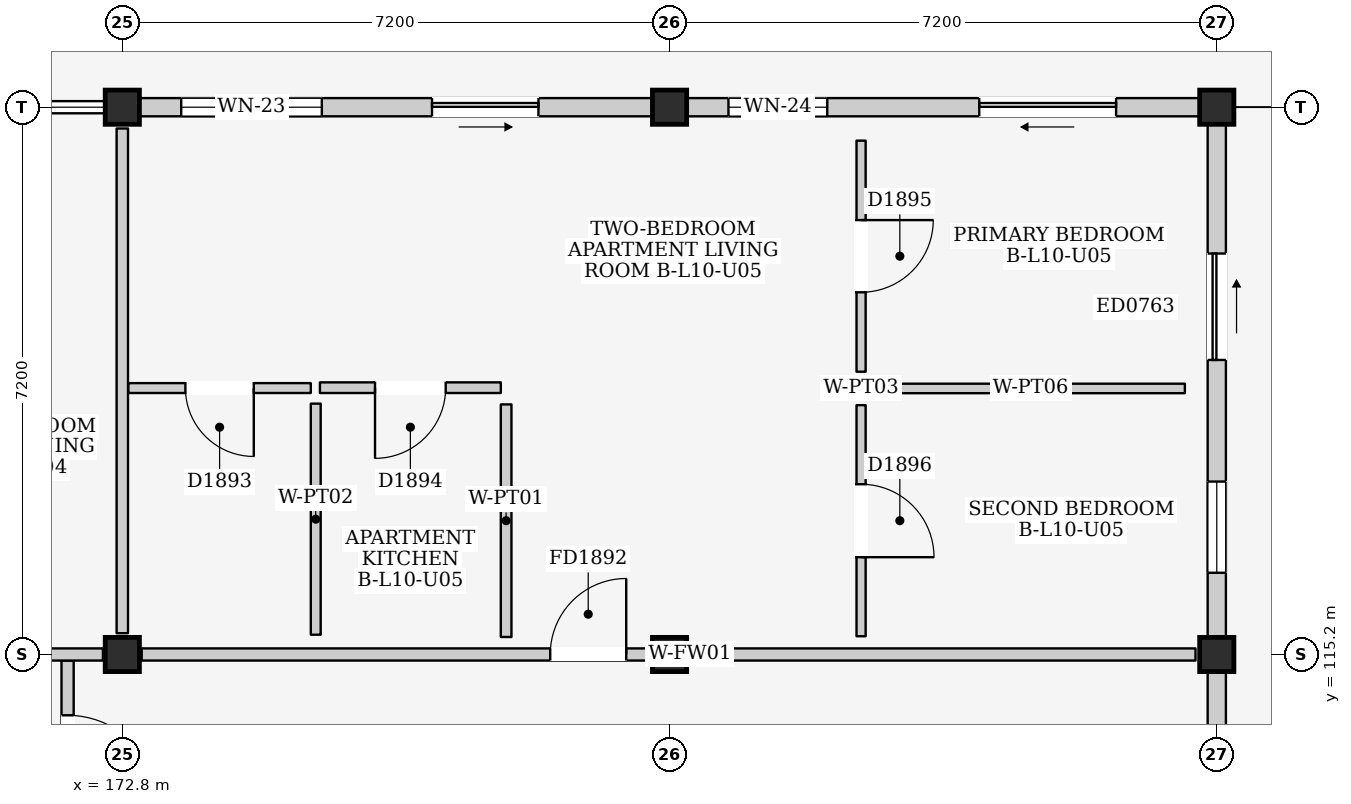
"""IFC4 building model, lengths in metres.
Left out: names, types, materials, properties, quantities, classifications, styles, units other than length and angle.
Written with IfcOpenShell. Run it as: python <this file> out.ifc"""

import sys

from ifc_helpers import new_model, si_unit, direction, frame, frame_2d, origin, origin_2d, place, context, subcontext, project, spatial, rectangle, extrude, element, fill, save


model = new_model("IFC4")
c1 = context("Model", 3, precision=1e-05, world=origin(), true_north=direction((0.0, 1.0)))
c2 = subcontext(c1, "Body", "Model", "MODEL_VIEW")
j1 = project(units=[si_unit("LENGTHUNIT", "METRE"), si_unit("PLANEANGLEUNIT", "RADIAN")], contexts=[c1])
p1 = place(None, origin())
s1 = spatial("IfcSite", under=j1, at=p1, CompositionType="ELEMENT")
p2 = place(p1, origin())
s2 = spatial("IfcBuilding", under=s1, at=p2, CompositionType="ELEMENT")
p3 = place(p2, frame((0.0, 0.0, 34.8)))
s3 = spatial("IfcBuildingStorey", under=s2, at=p3, CompositionType="ELEMENT", Elevation=34.8)
for number, where, z_axis, x_axis in (
    (1, (172.8, 115.2, 0.0), (0.0, 0.0, 1.0), (1.0, 0.0, 0.0)),
    (2, (172.8, 122.4, 0.0), (0.0, 0.0, 1.0), (1.0, 0.0, 0.0)),
    (3, (180.0, 115.2, 0.0), (0.0, 0.0, 1.0), (1.0, 0.0, 0.0)),
    (4, (180.0, 122.4, 0.0), (0.0, 0.0, 1.0), (1.0, 0.0, 0.0)),
    (5, (187.2, 115.2, 0.0), (0.0, 0.0, 1.0), (1.0, 0.0, 0.0)),
    (6, (187.2, 122.4, 0.0), (0.0, 0.0, 1.0), (1.0, 0.0, 0.0)),
):
    element("IfcColumn", number, at=place(p3, frame(where, z_axis=z_axis, x_axis=x_axis)), inside=s3, PredefinedType="COLUMN", context=c2, shape_type="SweptSolid", body=[
        extrude(rectangle(XDim=0.45, YDim=0.45, at=origin_2d()), origin(), (0.0, 0.0, 1.0), 3.2),
    ])
p4 = place(p3, frame((173.025, 122.4, 0.0), z_axis=(0.0, 0.0, 1.0), x_axis=(1.0, 0.0, 0.0)))
e7 = element("IfcWall", 7, at=p4, inside=s3, PredefinedType="ELEMENTEDWALL", context=c2, shape_type="SweptSolid", body=[
    extrude(rectangle(XDim=6.75, YDim=0.24, at=frame_2d((3.375, 0.0))), origin(), (0.0, 0.0, 1.0), 2.495),
])
p5 = place(p4, frame((3.85, 0.0, 0.0)))
e8 = element("IfcOpeningElement", 8, at=p5, cuts=e7, PredefinedType="OPENING", context=c2, shape_type="SweptSolid", body=[
    extrude(rectangle(XDim=1.4, YDim=2.1, at=frame_2d((0.7, 1.05))), frame((0.0, 0.135, 0.0), z_axis=(0.0, -1.0, 0.0), x_axis=(1.0, 0.0, 0.0)), (0.0, 0.0, 1.0), 0.27),
])
p6 = place(p4, frame((0.55, 0.0, 0.9)))
e9 = element("IfcOpeningElement", 9, at=p6, cuts=e7, PredefinedType="OPENING", context=c2, shape_type="SweptSolid", body=[
    extrude(rectangle(XDim=1.85, YDim=1.4, at=frame_2d((0.925, 0.7))), frame((0.0, 0.135, 0.0), z_axis=(0.0, -1.0, 0.0), x_axis=(1.0, 0.0, 0.0)), (0.0, 0.0, 1.0), 0.27),
])
p7 = place(p3, frame((187.2, 108.225, 0.0), z_axis=(0.0, 0.0, 1.0), x_axis=(0.0, 1.0, 0.0)))
e10 = element("IfcWall", 10, at=p7, inside=s3, PredefinedType="ELEMENTEDWALL", context=c2, shape_type="SweptSolid", body=[
    extrude(rectangle(XDim=6.75, YDim=0.24, at=frame_2d((3.375, 0.0))), origin(), (0.0, 0.0, 1.0), 2.495),
])
p8 = place(p7, frame((3.65, 0.0, 0.0)))
e11 = element("IfcOpeningElement", 11, at=p8, cuts=e10, PredefinedType="OPENING", context=c2, shape_type="SweptSolid", body=[
    extrude(rectangle(XDim=1.4, YDim=2.1, at=frame_2d((0.7, 1.05))), frame((0.0, 0.135, 0.0), z_axis=(0.0, -1.0, 0.0), x_axis=(1.0, 0.0, 0.0)), (0.0, 0.0, 1.0), 0.27),
])
p9 = place(p3, frame((180.225, 122.4, 0.0), z_axis=(0.0, 0.0, 1.0), x_axis=(1.0, 0.0, 0.0)))
e12 = element("IfcWall", 12, at=p9, inside=s3, PredefinedType="ELEMENTEDWALL", context=c2, shape_type="SweptSolid", body=[
    extrude(rectangle(XDim=6.75, YDim=0.24, at=frame_2d((3.375, 0.0))), origin(), (0.0, 0.0, 1.0), 2.495),
])
p10 = place(p9, frame((3.85, 0.0, 0.0)))
e13 = element("IfcOpeningElement", 13, at=p10, cuts=e12, PredefinedType="OPENING", context=c2, shape_type="SweptSolid", body=[
    extrude(rectangle(XDim=1.8, YDim=2.12, at=frame_2d((0.9, 1.06))), frame((0.0, 0.135, 0.0), z_axis=(0.0, -1.0, 0.0), x_axis=(1.0, 0.0, 0.0)), (0.0, 0.0, 1.0), 0.27),
])
p11 = place(p9, frame((0.55, 0.0, 0.9)))
e14 = element("IfcOpeningElement", 14, at=p11, cuts=e12, PredefinedType="OPENING", context=c2, shape_type="SweptSolid", body=[
    extrude(rectangle(XDim=1.3, YDim=1.25, at=frame_2d((0.65, 0.625))), frame((0.0, 0.135, 0.0), z_axis=(0.0, -1.0, 0.0), x_axis=(1.0, 0.0, 0.0)), (0.0, 0.0, 1.0), 0.27),
])
p12 = place(p3, frame((187.2, 115.425, 0.0), z_axis=(0.0, 0.0, 1.0), x_axis=(0.0, 1.0, 0.0)))
e15 = element("IfcWall", 15, at=p12, inside=s3, PredefinedType="ELEMENTEDWALL", context=c2, shape_type="SweptSolid", body=[
    extrude(rectangle(XDim=6.75, YDim=0.24, at=frame_2d((3.375, 0.0))), origin(), (0.0, 0.0, 1.0), 2.495),
])
p13 = place(p12, frame((3.65, 0.0, 0.0)))
e16 = element("IfcOpeningElement", 16, at=p13, cuts=e15, PredefinedType="OPENING", context=c2, shape_type="SweptSolid", body=[
    extrude(rectangle(XDim=1.4, YDim=2.1, at=frame_2d((0.7, 1.05))), frame((0.0, 0.135, 0.0), z_axis=(0.0, -1.0, 0.0), x_axis=(1.0, 0.0, 0.0)), (0.0, 0.0, 1.0), 0.27),
])
p14 = place(p12, frame((0.85, 0.0, 0.95)))
e17 = element("IfcOpeningElement", 17, at=p14, cuts=e15, PredefinedType="OPENING", context=c2, shape_type="SweptSolid", body=[
    extrude(rectangle(XDim=1.2, YDim=1.35, at=frame_2d((0.6, 0.675))), frame((0.0, 0.135, 0.0), z_axis=(0.0, -1.0, 0.0), x_axis=(1.0, 0.0, 0.0)), (0.0, 0.0, 1.0), 0.27),
])
p15 = place(p3, frame((172.08, 110.8, 0.0), z_axis=(0.0, 0.0, 1.0), x_axis=(0.0, 1.0, 0.0)))
e18 = element("IfcWall", 18, at=p15, inside=s3, PredefinedType="PARTITIONING", context=c2, shape_type="SweptSolid", body=[
    extrude(rectangle(XDim=4.32, YDim=0.16, at=frame_2d((2.16, 0.0))), origin(), (0.0, 0.0, 1.0), 2.96),
])
p16 = place(p15, frame((2.4, 0.0, 0.0)))
e19 = element("IfcOpeningElement", 19, at=p16, cuts=e18, PredefinedType="OPENING", context=c2, shape_type="SweptSolid", body=[
    extrude(rectangle(XDim=1.2, YDim=2.2, at=frame_2d((0.6, 1.1))), frame((0.0, 0.095, 0.0), z_axis=(0.0, -1.0, 0.0), x_axis=(1.0, 0.0, 0.0)), (0.0, 0.0, 1.0), 0.19),
])
p17 = place(p3, frame((165.855, 115.2, 0.0), z_axis=(0.0, 0.0, 1.0), x_axis=(1.0, 0.0, 0.0)))
e20 = element("IfcWall", 20, at=p17, inside=s3, PredefinedType="PARTITIONING", context=c2, shape_type="SweptSolid", body=[
    extrude(rectangle(XDim=6.69, YDim=0.16, at=frame_2d((3.345, 0.0))), origin(), (0.0, 0.0, 1.0), 2.345),
])
p18 = place(p17, frame((4.395, 0.0, 0.0)))
e21 = element("IfcOpeningElement", 21, at=p18, cuts=e20, PredefinedType="OPENING", context=c2, shape_type="SweptSolid", body=[
    extrude(rectangle(XDim=1.0, YDim=2.15, at=frame_2d((0.5, 1.075))), frame((0.0, 0.095, 0.0), z_axis=(0.0, -1.0, 0.0), x_axis=(1.0, 0.0, 0.0)), (0.0, 0.0, 1.0), 0.19),
])
p19 = place(p3, frame((172.8, 115.48, 0.0), z_axis=(0.0, 0.0, 1.0), x_axis=(0.0, 1.0, 0.0)))
e22 = element("IfcWall", 22, at=p19, inside=s3, PredefinedType="PARTITIONING", context=c2, shape_type="SweptSolid", body=[
    extrude(rectangle(XDim=6.64, YDim=0.15, at=frame_2d((3.32, 0.0))), origin(), (0.0, 0.0, 1.0), 2.445),
])
p20 = place(p3, frame((173.055, 115.2, 0.0), z_axis=(0.0, 0.0, 1.0), x_axis=(1.0, 0.0, 0.0)))
e23 = element("IfcWall", 23, at=p20, inside=s3, PredefinedType="PARTITIONING", context=c2, shape_type="SweptSolid", body=[
    extrude(rectangle(XDim=6.69, YDim=0.16, at=frame_2d((3.345, 0.0))), origin(), (0.0, 0.0, 1.0), 2.345),
])
p21 = place(p20, frame((5.375, 0.0, 0.0)))
e24 = element("IfcOpeningElement", 24, at=p21, cuts=e23, PredefinedType="OPENING", context=c2, shape_type="SweptSolid", body=[
    extrude(rectangle(XDim=1.0, YDim=2.15, at=frame_2d((0.5, 1.075))), frame((0.0, 0.095, 0.0), z_axis=(0.0, -1.0, 0.0), x_axis=(1.0, 0.0, 0.0)), (0.0, 0.0, 1.0), 0.19),
])
p22 = place(p3, frame((180.255, 115.2, 0.0), z_axis=(0.0, 0.0, 1.0), x_axis=(1.0, 0.0, 0.0)))
e25 = element("IfcWall", 25, at=p22, inside=s3, PredefinedType="PARTITIONING", context=c2, shape_type="SweptSolid", body=[
    extrude(rectangle(XDim=6.665, YDim=0.16, at=frame_2d((3.333, 0.0))), origin(), (0.0, 0.0, 1.0), 2.345),
])
p23 = place(p3, frame((172.88, 118.705, 0.0), z_axis=(0.0, 0.0, 1.0), x_axis=(1.0, 0.0, 0.0)))
e26 = element("IfcWall", 26, at=p23, inside=s3, PredefinedType="PARTITIONING", context=c2, shape_type="SweptSolid", body=[
    extrude(rectangle(XDim=2.4, YDim=0.13, at=frame_2d((1.2, 0.0))), origin(), (0.0, 0.0, 1.0), 2.96),
])
p24 = place(p23, frame((0.75, 0.0, 0.0)))
e27 = element("IfcOpeningElement", 27, at=p24, cuts=e26, PredefinedType="OPENING", context=c2, shape_type="SweptSolid", body=[
    extrude(rectangle(XDim=0.9, YDim=2.1, at=frame_2d((0.45, 1.05))), frame((0.0, 0.08, 0.0), z_axis=(0.0, -1.0, 0.0), x_axis=(1.0, 0.0, 0.0)), (0.0, 0.0, 1.0), 0.16),
])
p25 = place(p3, frame((175.345, 115.46, 0.0), z_axis=(0.0, 0.0, 1.0), x_axis=(0.0, 1.0, 0.0)))
e28 = element("IfcWall", 28, at=p25, inside=s3, PredefinedType="PARTITIONING", context=c2, shape_type="SweptSolid", body=[
    extrude(rectangle(XDim=3.04, YDim=0.13, at=frame_2d((1.52, 0.0))), origin(), (0.0, 0.0, 1.0), 2.96),
])
p26 = place(p3, frame((175.4, 118.71, 0.0), z_axis=(0.0, 0.0, 1.0), x_axis=(1.0, 0.0, 0.0)))
e29 = element("IfcWall", 29, at=p26, inside=s3, PredefinedType="PARTITIONING", context=c2, shape_type="SweptSolid", body=[
    extrude(rectangle(XDim=2.38, YDim=0.14, at=frame_2d((1.19, 0.0))), origin(), (0.0, 0.0, 1.0), 2.96),
])
p27 = place(p26, frame((0.725, 0.0, 0.0)))
e30 = element("IfcOpeningElement", 30, at=p27, cuts=e29, PredefinedType="OPENING", context=c2, shape_type="SweptSolid", body=[
    extrude(rectangle(XDim=0.93, YDim=2.14, at=frame_2d((0.465, 1.07))), frame((0.0, 0.085, 0.0), z_axis=(0.0, -1.0, 0.0), x_axis=(1.0, 0.0, 0.0)), (0.0, 0.0, 1.0), 0.17),
])
p28 = place(p3, frame((177.85, 115.43, 0.0), z_axis=(0.0, 0.0, 1.0), x_axis=(0.0, 1.0, 0.0)))
e31 = element("IfcWall", 31, at=p28, inside=s3, PredefinedType="PARTITIONING", context=c2, shape_type="SweptSolid", body=[
    extrude(rectangle(XDim=3.06, YDim=0.14, at=frame_2d((1.53, 0.0))), origin(), (0.0, 0.0, 1.0), 2.96),
])
p29 = place(p3, frame((182.52, 118.92, 0.0), z_axis=(0.0, 0.0, 1.0), x_axis=(0.0, 1.0, 0.0)))
e32 = element("IfcWall", 32, at=p29, inside=s3, PredefinedType="PARTITIONING", context=c2, shape_type="SweptSolid", body=[
    extrude(rectangle(XDim=3.04, YDim=0.12, at=frame_2d((1.52, 0.0))), origin(), (0.0, 0.0, 1.0), 2.96),
])
p30 = place(p29, frame((1.045, 0.0, 0.0)))
e33 = element("IfcOpeningElement", 33, at=p30, cuts=e32, PredefinedType="OPENING", context=c2, shape_type="SweptSolid", body=[
    extrude(rectangle(XDim=0.95, YDim=2.15, at=frame_2d((0.475, 1.075))), frame((0.0, 0.075, 0.0), z_axis=(0.0, -1.0, 0.0), x_axis=(1.0, 0.0, 0.0)), (0.0, 0.0, 1.0), 0.15),
])
p31 = place(p3, frame((182.72, 118.7, 0.0), z_axis=(0.0, 0.0, 1.0), x_axis=(1.0, 0.0, 0.0)))
e34 = element("IfcWall", 34, at=p31, inside=s3, PredefinedType="PARTITIONING", context=c2, shape_type="SweptSolid", body=[
    extrude(rectangle(XDim=4.06, YDim=0.125, at=frame_2d((2.03, 0.0))), origin(), (0.0, 0.0, 1.0), 2.96),
])
p32 = place(p3, frame((182.52, 115.44, 0.0), z_axis=(0.0, 0.0, 1.0), x_axis=(0.0, 1.0, 0.0)))
e35 = element("IfcWall", 35, at=p32, inside=s3, PredefinedType="PARTITIONING", context=c2, shape_type="SweptSolid", body=[
    extrude(rectangle(XDim=3.04, YDim=0.12, at=frame_2d((1.52, 0.0))), origin(), (0.0, 0.0, 1.0), 2.96),
])
p33 = place(p32, frame((1.04, 0.0, 0.0)))
e36 = element("IfcOpeningElement", 36, at=p33, cuts=e35, PredefinedType="OPENING", context=c2, shape_type="SweptSolid", body=[
    extrude(rectangle(XDim=0.96, YDim=2.15, at=frame_2d((0.48, 1.075))), frame((0.0, 0.075, 0.0), z_axis=(0.0, -1.0, 0.0), x_axis=(1.0, 0.0, 0.0)), (0.0, 0.0, 1.0), 0.15),
])
p34 = place(p5, frame((1.4, 0.0, 0.0), z_axis=(0.0, 0.0, 1.0), x_axis=(-1.0, 0.0, 0.0)))
e37 = element("IfcDoor", 37, at=p34, inside=s3, OperationType="SLIDING_TO_RIGHT", PredefinedType="DOOR", context=c2, shape_type="SweptSolid", body=[
    extrude(rectangle(XDim=1.4, YDim=2.1, at=frame_2d((0.7, 1.05))), frame((0.0, 0.025, 0.0), z_axis=(0.0, -1.0, 0.0), x_axis=(1.0, 0.0, 0.0)), (0.0, 0.0, 1.0), 0.05),
])
fill(e8, e37)
p35 = place(p6, origin())
e38 = element("IfcWindow", 38, at=p35, inside=s3, PartitioningType="DOUBLE_PANEL_VERTICAL", PredefinedType="WINDOW", context=c2, shape_type="SweptSolid", body=[
    extrude(rectangle(XDim=1.85, YDim=1.4, at=frame_2d((0.925, 0.7))), frame((0.0, 0.03, 0.0), z_axis=(0.0, -1.0, 0.0), x_axis=(1.0, 0.0, 0.0)), (0.0, 0.0, 1.0), 0.06),
])
fill(e9, e38)
p36 = place(p10, frame((1.8, 0.0, 0.0), z_axis=(0.0, 0.0, 1.0), x_axis=(-1.0, 0.0, 0.0)))
e39 = element("IfcDoor", 39, at=p36, inside=s3, OperationType="SLIDING_TO_LEFT", PredefinedType="DOOR", context=c2, shape_type="SweptSolid", body=[
    extrude(rectangle(XDim=1.8, YDim=2.12, at=frame_2d((0.9, 1.06))), frame((0.0, 0.025, 0.0), z_axis=(0.0, -1.0, 0.0), x_axis=(1.0, 0.0, 0.0)), (0.0, 0.0, 1.0), 0.05),
])
fill(e13, e39)
p37 = place(p11, origin())
e40 = element("IfcWindow", 40, at=p37, inside=s3, PartitioningType="SINGLE_PANEL", PredefinedType="WINDOW", context=c2, shape_type="SweptSolid", body=[
    extrude(rectangle(XDim=1.3, YDim=1.25, at=frame_2d((0.65, 0.625))), frame((0.0, 0.03, 0.0), z_axis=(0.0, -1.0, 0.0), x_axis=(1.0, 0.0, 0.0)), (0.0, 0.0, 1.0), 0.06),
])
fill(e14, e40)
p38 = place(p13, frame((1.4, 0.0, 0.0), z_axis=(0.0, 0.0, 1.0), x_axis=(-1.0, 0.0, 0.0)))
e41 = element("IfcDoor", 41, at=p38, inside=s3, OperationType="SLIDING_TO_RIGHT", PredefinedType="DOOR", context=c2, shape_type="SweptSolid", body=[
    extrude(rectangle(XDim=1.4, YDim=2.1, at=frame_2d((0.7, 1.05))), frame((0.0, 0.025, 0.0), z_axis=(0.0, -1.0, 0.0), x_axis=(1.0, 0.0, 0.0)), (0.0, 0.0, 1.0), 0.05),
])
fill(e16, e41)
p39 = place(p14, origin())
e42 = element("IfcWindow", 42, at=p39, inside=s3, PartitioningType="SINGLE_PANEL", PredefinedType="WINDOW", context=c2, shape_type="SweptSolid", body=[
    extrude(rectangle(XDim=1.2, YDim=1.35, at=frame_2d((0.6, 0.675))), frame((0.0, 0.03, 0.0), z_axis=(0.0, -1.0, 0.0), x_axis=(1.0, 0.0, 0.0)), (0.0, 0.0, 1.0), 0.06),
])
fill(e17, e42)
p40 = place(p16, frame((1.2, 0.0, 0.0), z_axis=(0.0, 0.0, 1.0), x_axis=(-1.0, 0.0, 0.0)))
e43 = element("IfcDoor", 43, at=p40, inside=s3, OperationType="SINGLE_SWING_RIGHT", PredefinedType="DOOR", context=c2, shape_type="SweptSolid", body=[
    extrude(rectangle(XDim=1.2, YDim=2.2, at=frame_2d((0.6, 1.1))), frame((0.0, 0.025, 0.0), z_axis=(0.0, -1.0, 0.0), x_axis=(1.0, 0.0, 0.0)), (0.0, 0.0, 1.0), 0.05),
])
fill(e19, e43)
p41 = place(p21, origin())
e44 = element("IfcDoor", 44, at=p41, inside=s3, OperationType="SINGLE_SWING_RIGHT", PredefinedType="DOOR", context=c2, shape_type="SweptSolid", body=[
    extrude(rectangle(XDim=1.0, YDim=2.15, at=frame_2d((0.5, 1.075))), frame((0.0, 0.025, 0.0), z_axis=(0.0, -1.0, 0.0), x_axis=(1.0, 0.0, 0.0)), (0.0, 0.0, 1.0), 0.05),
])
fill(e24, e44)
p42 = place(p24, frame((0.9, 0.0, 0.0), z_axis=(0.0, 0.0, 1.0), x_axis=(-1.0, 0.0, 0.0)))
e45 = element("IfcDoor", 45, at=p42, inside=s3, OperationType="SINGLE_SWING_LEFT", PredefinedType="DOOR", context=c2, shape_type="SweptSolid", body=[
    extrude(rectangle(XDim=0.9, YDim=2.1, at=frame_2d((0.45, 1.05))), frame((0.0, 0.025, 0.0), z_axis=(0.0, -1.0, 0.0), x_axis=(1.0, 0.0, 0.0)), (0.0, 0.0, 1.0), 0.05),
])
fill(e27, e45)
p43 = place(p27, frame((0.93, 0.0, 0.0), z_axis=(0.0, 0.0, 1.0), x_axis=(-1.0, 0.0, 0.0)))
e46 = element("IfcDoor", 46, at=p43, inside=s3, OperationType="SINGLE_SWING_RIGHT", PredefinedType="DOOR", context=c2, shape_type="SweptSolid", body=[
    extrude(rectangle(XDim=0.93, YDim=2.14, at=frame_2d((0.465, 1.07))), frame((0.0, 0.025, 0.0), z_axis=(0.0, -1.0, 0.0), x_axis=(1.0, 0.0, 0.0)), (0.0, 0.0, 1.0), 0.05),
])
fill(e30, e46)
p44 = place(p30, frame((0.95, 0.0, 0.0), z_axis=(0.0, 0.0, 1.0), x_axis=(-1.0, 0.0, 0.0)))
e47 = element("IfcDoor", 47, at=p44, inside=s3, OperationType="SINGLE_SWING_LEFT", PredefinedType="DOOR", context=c2, shape_type="SweptSolid", body=[
    extrude(rectangle(XDim=0.95, YDim=2.15, at=frame_2d((0.475, 1.075))), frame((0.0, 0.025, 0.0), z_axis=(0.0, -1.0, 0.0), x_axis=(1.0, 0.0, 0.0)), (0.0, 0.0, 1.0), 0.05),
])
fill(e33, e47)
p45 = place(p33, frame((0.96, 0.0, 0.0), z_axis=(0.0, 0.0, 1.0), x_axis=(-1.0, 0.0, 0.0)))
e48 = element("IfcDoor", 48, at=p45, inside=s3, OperationType="SINGLE_SWING_RIGHT", PredefinedType="DOOR", context=c2, shape_type="SweptSolid", body=[
    extrude(rectangle(XDim=0.96, YDim=2.15, at=frame_2d((0.48, 1.075))), frame((0.0, 0.025, 0.0), z_axis=(0.0, -1.0, 0.0), x_axis=(1.0, 0.0, 0.0)), (0.0, 0.0, 1.0), 0.05),
])
fill(e36, e48)
save(model, sys.argv[1])
